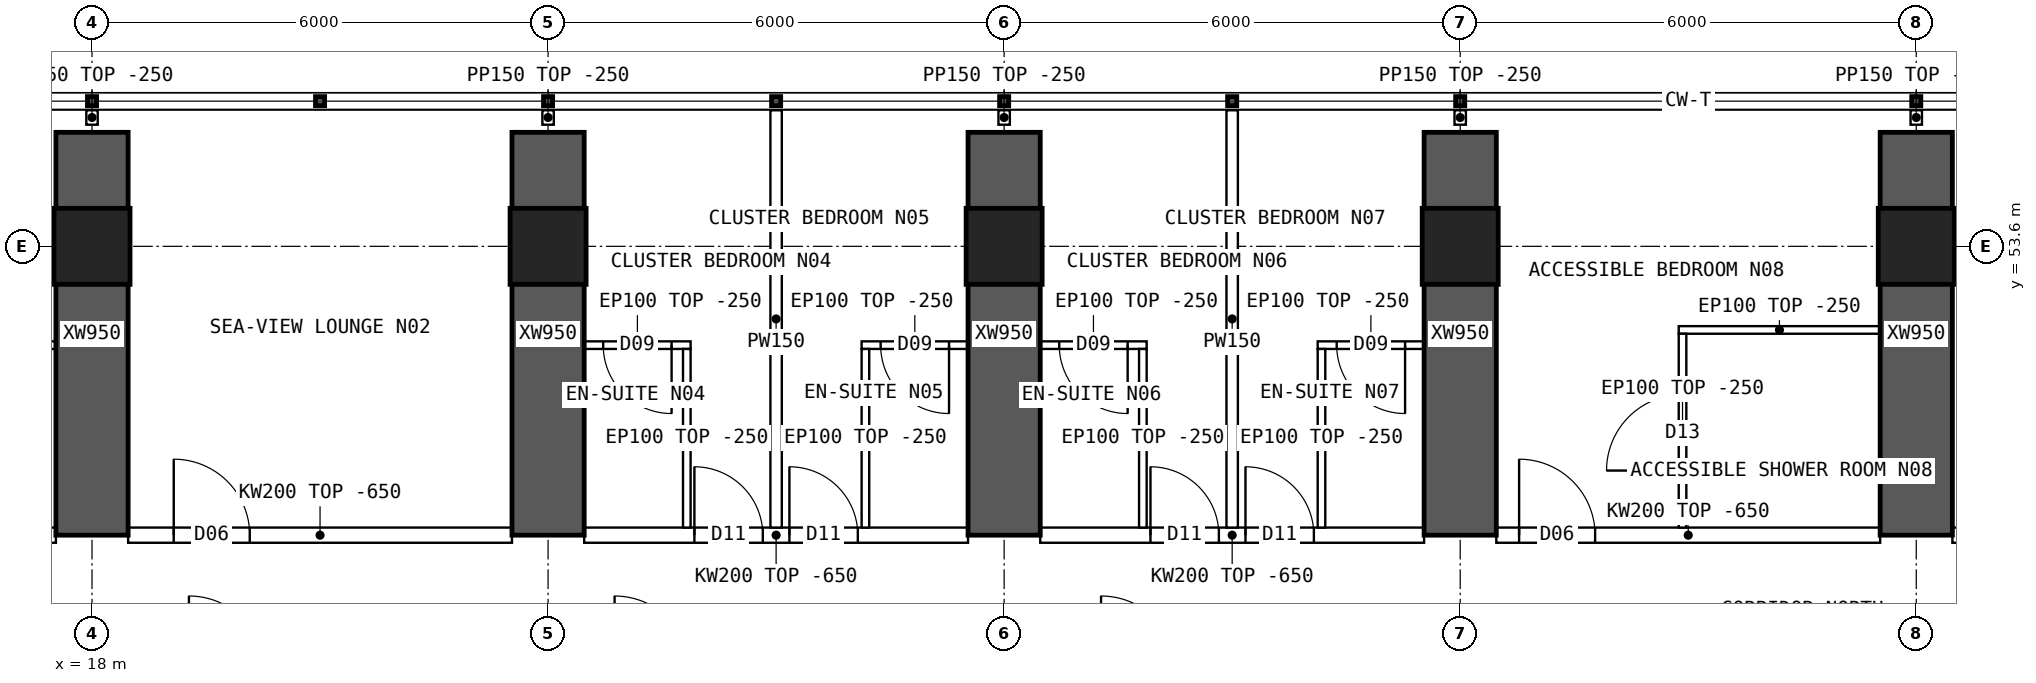
"""IFC4 building model, lengths in metres.
Left out: names, types, materials, properties, quantities, classifications, styles, units other than length and angle.
Written with IfcOpenShell. Run it as: python <this file> out.ifc"""

import sys

from ifc_helpers import new_model, si_unit, direction, frame, frame_2d, origin, origin_2d, place, context, subcontext, project, spatial, polyline, rectangle, hollow_rectangle, outline, extrude, element, fill, save


model = new_model("IFC4")
c1 = context("Model", 3, precision=1e-05, world=origin(), true_north=direction((0.0, 1.0)))
c2 = subcontext(c1, "Body", "Model", "MODEL_VIEW")
j1 = project(units=[si_unit("LENGTHUNIT", "METRE"), si_unit("PLANEANGLEUNIT", "RADIAN")], contexts=[c1])
p1 = place(None, origin())
s1 = spatial("IfcSite", under=j1, at=p1, CompositionType="ELEMENT")
p2 = place(p1, origin())
s2 = spatial("IfcBuilding", under=s1, at=p2, CompositionType="ELEMENT")
p3 = place(p2, frame((0.0, 0.0, 88.15)))
s3 = spatial("IfcBuildingStorey", under=s2, at=p3, CompositionType="ELEMENT", Elevation=88.15)
for number, where, z_axis, x_axis in (
    (1, (18.0, 53.6, 0.0), (0.0, 0.0, 1.0), (1.0, 0.0, 0.0)),
    (2, (24.0, 53.6, 0.0), (0.0, 0.0, 1.0), (1.0, 0.0, 0.0)),
    (3, (30.0, 53.6, 0.0), (0.0, 0.0, 1.0), (1.0, 0.0, 0.0)),
    (4, (36.0, 53.6, 0.0), (0.0, 0.0, 1.0), (1.0, 0.0, 0.0)),
    (5, (42.0, 53.6, 0.0), (0.0, 0.0, 1.0), (1.0, 0.0, 0.0)),
):
    element("IfcColumn", number, at=place(p3, frame(where, z_axis=z_axis, x_axis=x_axis)), inside=s3, PredefinedType="COLUMN", context=c2, shape_type="SweptSolid", body=[
        extrude(hollow_rectangle(XDim=1.0, YDim=1.0, WallThickness=0.1, at=origin_2d()), origin(), (0.0, 0.0, 1.0), 3.75),
    ])
for number, where, z_axis, x_axis in (
    (6, (18.0, 49.8, 0.0), (0.0, 0.0, 1.0), (0.0, 1.0, 0.0)),
    (7, (24.0, 49.8, 0.0), (0.0, 0.0, 1.0), (0.0, 1.0, 0.0)),
    (8, (30.0, 49.8, 0.0), (0.0, 0.0, 1.0), (0.0, 1.0, 0.0)),
    (9, (36.0, 49.8, 0.0), (0.0, 0.0, 1.0), (0.0, 1.0, 0.0)),
    (10, (42.0, 49.8, 0.0), (0.0, 0.0, 1.0), (0.0, 1.0, 0.0)),
):
    element("IfcWall", number, at=place(p3, frame(where, z_axis=z_axis, x_axis=x_axis)), inside=s3, PredefinedType="SHEAR", context=c2, shape_type="SweptSolid", body=[
        extrude(rectangle(XDim=5.3, YDim=0.95, at=frame_2d((2.65, 0.0))), origin(), (0.0, 0.0, 1.0), 3.75),
    ])
p4 = place(p3, frame((12.475, 49.8, 0.0), z_axis=(0.0, 0.0, 1.0), x_axis=(1.0, 0.0, 0.0)))
e11 = element("IfcWall", 11, at=p4, inside=s3, PredefinedType="SOLIDWALL", context=c2, shape_type="SweptSolid", body=[
    extrude(outline(polyline([(0.0, 0.0), (5.05, 0.0), (5.05, 3.1), (0.0, 3.1), (0.0, 0.0)])), frame((0.0, 0.1, 0.0), z_axis=(0.0, -1.0, 0.0), x_axis=(1.0, 0.0, 0.0)), (0.0, 0.0, 1.0), 0.2),
])
p5 = place(p4, frame((1.45, 0.0, 0.0)))
e12 = element("IfcOpeningElement", 12, at=p5, cuts=e11, PredefinedType="OPENING", context=c2, shape_type="SweptSolid", body=[
    extrude(rectangle(XDim=0.9, YDim=2.1, at=frame_2d((0.45, 1.05))), frame((0.0, 0.11, 0.0), z_axis=(0.0, -1.0, 0.0), x_axis=(1.0, 0.0, 0.0)), (0.0, 0.0, 1.0), 0.22),
])
p6 = place(p4, frame((2.7, 0.0, 0.0)))
e13 = element("IfcOpeningElement", 13, at=p6, cuts=e11, PredefinedType="OPENING", context=c2, shape_type="SweptSolid", body=[
    extrude(rectangle(XDim=0.9, YDim=2.1, at=frame_2d((0.45, 1.05))), frame((0.0, 0.11, 0.0), z_axis=(0.0, -1.0, 0.0), x_axis=(1.0, 0.0, 0.0)), (0.0, 0.0, 1.0), 0.22),
])
p7 = place(p3, frame((18.475, 49.8, 0.0), z_axis=(0.0, 0.0, 1.0), x_axis=(1.0, 0.0, 0.0)))
e14 = element("IfcWall", 14, at=p7, inside=s3, PredefinedType="SOLIDWALL", context=c2, shape_type="SweptSolid", body=[
    extrude(outline(polyline([(0.0, 0.0), (5.05, 0.0), (5.05, 3.1), (0.0, 3.1), (0.0, 0.0)])), frame((0.0, 0.1, 0.0), z_axis=(0.0, -1.0, 0.0), x_axis=(1.0, 0.0, 0.0)), (0.0, 0.0, 1.0), 0.2),
])
p8 = place(p7, frame((0.6, 0.0, 0.0)))
e15 = element("IfcOpeningElement", 15, at=p8, cuts=e14, PredefinedType="OPENING", context=c2, shape_type="SweptSolid", body=[
    extrude(rectangle(XDim=1.0, YDim=2.1, at=frame_2d((0.5, 1.05))), frame((0.0, 0.11, 0.0), z_axis=(0.0, -1.0, 0.0), x_axis=(1.0, 0.0, 0.0)), (0.0, 0.0, 1.0), 0.22),
])
p9 = place(p3, frame((24.475, 49.8, 0.0), z_axis=(0.0, 0.0, 1.0), x_axis=(1.0, 0.0, 0.0)))
e16 = element("IfcWall", 16, at=p9, inside=s3, PredefinedType="SOLIDWALL", context=c2, shape_type="SweptSolid", body=[
    extrude(outline(polyline([(0.0, 0.0), (5.05, 0.0), (5.05, 3.1), (0.0, 3.1), (0.0, 0.0)])), frame((0.0, 0.1, 0.0), z_axis=(0.0, -1.0, 0.0), x_axis=(1.0, 0.0, 0.0)), (0.0, 0.0, 1.0), 0.2),
])
p10 = place(p9, frame((1.45, 0.0, 0.0)))
e17 = element("IfcOpeningElement", 17, at=p10, cuts=e16, PredefinedType="OPENING", context=c2, shape_type="SweptSolid", body=[
    extrude(rectangle(XDim=0.9, YDim=2.1, at=frame_2d((0.45, 1.05))), frame((0.0, 0.11, 0.0), z_axis=(0.0, -1.0, 0.0), x_axis=(1.0, 0.0, 0.0)), (0.0, 0.0, 1.0), 0.22),
])
p11 = place(p9, frame((2.7, 0.0, 0.0)))
e18 = element("IfcOpeningElement", 18, at=p11, cuts=e16, PredefinedType="OPENING", context=c2, shape_type="SweptSolid", body=[
    extrude(rectangle(XDim=0.9, YDim=2.1, at=frame_2d((0.45, 1.05))), frame((0.0, 0.11, 0.0), z_axis=(0.0, -1.0, 0.0), x_axis=(1.0, 0.0, 0.0)), (0.0, 0.0, 1.0), 0.22),
])
p12 = place(p3, frame((30.475, 49.8, 0.0), z_axis=(0.0, 0.0, 1.0), x_axis=(1.0, 0.0, 0.0)))
e19 = element("IfcWall", 19, at=p12, inside=s3, PredefinedType="SOLIDWALL", context=c2, shape_type="SweptSolid", body=[
    extrude(outline(polyline([(0.0, 0.0), (5.05, 0.0), (5.05, 3.1), (0.0, 3.1), (0.0, 0.0)])), frame((0.0, 0.1, 0.0), z_axis=(0.0, -1.0, 0.0), x_axis=(1.0, 0.0, 0.0)), (0.0, 0.0, 1.0), 0.2),
])
p13 = place(p12, frame((1.45, 0.0, 0.0)))
e20 = element("IfcOpeningElement", 20, at=p13, cuts=e19, PredefinedType="OPENING", context=c2, shape_type="SweptSolid", body=[
    extrude(rectangle(XDim=0.9, YDim=2.1, at=frame_2d((0.45, 1.05))), frame((0.0, 0.11, 0.0), z_axis=(0.0, -1.0, 0.0), x_axis=(1.0, 0.0, 0.0)), (0.0, 0.0, 1.0), 0.22),
])
p14 = place(p12, frame((2.7, 0.0, 0.0)))
e21 = element("IfcOpeningElement", 21, at=p14, cuts=e19, PredefinedType="OPENING", context=c2, shape_type="SweptSolid", body=[
    extrude(rectangle(XDim=0.9, YDim=2.1, at=frame_2d((0.45, 1.05))), frame((0.0, 0.11, 0.0), z_axis=(0.0, -1.0, 0.0), x_axis=(1.0, 0.0, 0.0)), (0.0, 0.0, 1.0), 0.22),
])
p15 = place(p3, frame((36.475, 49.8, 0.0), z_axis=(0.0, 0.0, 1.0), x_axis=(1.0, 0.0, 0.0)))
e22 = element("IfcWall", 22, at=p15, inside=s3, PredefinedType="SOLIDWALL", context=c2, shape_type="SweptSolid", body=[
    extrude(outline(polyline([(0.0, 0.0), (5.05, 0.0), (5.05, 3.1), (0.0, 3.1), (0.0, 0.0)])), frame((0.0, 0.1, 0.0), z_axis=(0.0, -1.0, 0.0), x_axis=(1.0, 0.0, 0.0)), (0.0, 0.0, 1.0), 0.2),
])
p16 = place(p15, frame((0.3, 0.0, 0.0)))
e23 = element("IfcOpeningElement", 23, at=p16, cuts=e22, PredefinedType="OPENING", context=c2, shape_type="SweptSolid", body=[
    extrude(rectangle(XDim=1.0, YDim=2.1, at=frame_2d((0.5, 1.05))), frame((0.0, 0.11, 0.0), z_axis=(0.0, -1.0, 0.0), x_axis=(1.0, 0.0, 0.0)), (0.0, 0.0, 1.0), 0.22),
])
p17 = place(p3, frame((42.475, 49.8, 0.0), z_axis=(0.0, 0.0, 1.0), x_axis=(1.0, 0.0, 0.0)))
e24 = element("IfcWall", 24, at=p17, inside=s3, PredefinedType="SOLIDWALL", context=c2, shape_type="SweptSolid", body=[
    extrude(outline(polyline([(0.0, 0.0), (5.05, 0.0), (5.05, 3.1), (0.0, 3.1), (0.0, 0.0)])), frame((0.0, 0.1, 0.0), z_axis=(0.0, -1.0, 0.0), x_axis=(1.0, 0.0, 0.0)), (0.0, 0.0, 1.0), 0.2),
])
p18 = place(p17, frame((0.6, 0.0, 0.0)))
e25 = element("IfcOpeningElement", 25, at=p18, cuts=e24, PredefinedType="OPENING", context=c2, shape_type="SweptSolid", body=[
    extrude(rectangle(XDim=1.0, YDim=2.1, at=frame_2d((0.5, 1.05))), frame((0.0, 0.11, 0.0), z_axis=(0.0, -1.0, 0.0), x_axis=(1.0, 0.0, 0.0)), (0.0, 0.0, 1.0), 0.22),
])
p19 = place(p3, frame((16.125, 52.3, 0.0), z_axis=(0.0, 0.0, 1.0), x_axis=(1.0, 0.0, 0.0)))
e26 = element("IfcWall", 26, at=p19, inside=s3, PredefinedType="PARTITIONING", context=c2, shape_type="SweptSolid", body=[
    extrude(rectangle(XDim=1.4, YDim=0.1, at=frame_2d((0.7, 0.0))), origin(), (0.0, 0.0, 1.0), 3.5),
])
p20 = place(p19, frame((0.25, 0.0, 0.0)))
e27 = element("IfcOpeningElement", 27, at=p20, cuts=e26, PredefinedType="OPENING", context=c2, shape_type="SweptSolid", body=[
    extrude(rectangle(XDim=0.9, YDim=2.1, at=frame_2d((0.45, 1.05))), frame((0.0, 0.06, 0.0), z_axis=(0.0, -1.0, 0.0), x_axis=(1.0, 0.0, 0.0)), (0.0, 0.0, 1.0), 0.12),
])
p21 = place(p3, frame((27.0, 55.39, 0.0), z_axis=(0.0, 0.0, 1.0), x_axis=(0.0, -1.0, 0.0)))
e28 = element("IfcWall", 28, at=p21, inside=s3, PredefinedType="PARTITIONING", context=c2, shape_type="SweptSolid", body=[
    extrude(outline(polyline([(0.0, 0.0), (5.49, 0.0), (5.49, 3.1), (5.442, 3.1), (5.44, 3.5), (1.992, 3.5), (1.99, 3.1), (1.592, 3.1), (1.59, 3.5), (0.0, 3.5), (0.0, 0.0)])), frame((0.0, 0.075, 0.0), z_axis=(0.0, -1.0, 0.0), x_axis=(1.0, 0.0, 0.0)), (0.0, 0.0, 1.0), 0.15),
])
p22 = place(p3, frame((24.475, 52.3, 0.0), z_axis=(0.0, 0.0, 1.0), x_axis=(1.0, 0.0, 0.0)))
e29 = element("IfcWall", 29, at=p22, inside=s3, PredefinedType="PARTITIONING", context=c2, shape_type="SweptSolid", body=[
    extrude(rectangle(XDim=1.4, YDim=0.1, at=frame_2d((0.7, 0.0))), origin(), (0.0, 0.0, 1.0), 3.5),
])
p23 = place(p22, frame((0.25, 0.0, 0.0)))
e30 = element("IfcOpeningElement", 30, at=p23, cuts=e29, PredefinedType="OPENING", context=c2, shape_type="SweptSolid", body=[
    extrude(rectangle(XDim=0.9, YDim=2.1, at=frame_2d((0.45, 1.05))), frame((0.0, 0.06, 0.0), z_axis=(0.0, -1.0, 0.0), x_axis=(1.0, 0.0, 0.0)), (0.0, 0.0, 1.0), 0.12),
])
p24 = place(p3, frame((25.825, 52.25, 0.0), z_axis=(0.0, 0.0, 1.0), x_axis=(0.0, -1.0, 0.0)))
e31 = element("IfcWall", 31, at=p24, inside=s3, PredefinedType="PARTITIONING", context=c2, shape_type="SweptSolid", body=[
    extrude(outline(polyline([(0.0, 0.0), (2.35, 0.0), (2.35, 3.1), (2.302, 3.1), (2.3, 3.5), (0.0, 3.5), (0.0, 0.0)])), frame((0.0, 0.05, 0.0), z_axis=(0.0, -1.0, 0.0), x_axis=(1.0, 0.0, 0.0)), (0.0, 0.0, 1.0), 0.1),
])
p25 = place(p3, frame((28.125, 52.3, 0.0), z_axis=(0.0, 0.0, 1.0), x_axis=(1.0, 0.0, 0.0)))
e32 = element("IfcWall", 32, at=p25, inside=s3, PredefinedType="PARTITIONING", context=c2, shape_type="SweptSolid", body=[
    extrude(rectangle(XDim=1.4, YDim=0.1, at=frame_2d((0.7, 0.0))), origin(), (0.0, 0.0, 1.0), 3.5),
])
p26 = place(p25, frame((0.25, 0.0, 0.0)))
e33 = element("IfcOpeningElement", 33, at=p26, cuts=e32, PredefinedType="OPENING", context=c2, shape_type="SweptSolid", body=[
    extrude(rectangle(XDim=0.9, YDim=2.1, at=frame_2d((0.45, 1.05))), frame((0.0, 0.06, 0.0), z_axis=(0.0, -1.0, 0.0), x_axis=(1.0, 0.0, 0.0)), (0.0, 0.0, 1.0), 0.12),
])
p27 = place(p3, frame((28.175, 52.25, 0.0), z_axis=(0.0, 0.0, 1.0), x_axis=(0.0, -1.0, 0.0)))
e34 = element("IfcWall", 34, at=p27, inside=s3, PredefinedType="PARTITIONING", context=c2, shape_type="SweptSolid", body=[
    extrude(outline(polyline([(0.0, 0.0), (2.35, 0.0), (2.35, 3.1), (2.302, 3.1), (2.3, 3.5), (0.0, 3.5), (0.0, 0.0)])), frame((0.0, 0.05, 0.0), z_axis=(0.0, -1.0, 0.0), x_axis=(1.0, 0.0, 0.0)), (0.0, 0.0, 1.0), 0.1),
])
p28 = place(p3, frame((33.0, 55.39, 0.0), z_axis=(0.0, 0.0, 1.0), x_axis=(0.0, -1.0, 0.0)))
e35 = element("IfcWall", 35, at=p28, inside=s3, PredefinedType="PARTITIONING", context=c2, shape_type="SweptSolid", body=[
    extrude(outline(polyline([(0.0, 0.0), (5.49, 0.0), (5.49, 3.1), (5.442, 3.1), (5.44, 3.5), (1.992, 3.5), (1.99, 3.1), (1.592, 3.1), (1.59, 3.5), (0.0, 3.5), (0.0, 0.0)])), frame((0.0, 0.075, 0.0), z_axis=(0.0, -1.0, 0.0), x_axis=(1.0, 0.0, 0.0)), (0.0, 0.0, 1.0), 0.15),
])
p29 = place(p3, frame((30.475, 52.3, 0.0), z_axis=(0.0, 0.0, 1.0), x_axis=(1.0, 0.0, 0.0)))
e36 = element("IfcWall", 36, at=p29, inside=s3, PredefinedType="PARTITIONING", context=c2, shape_type="SweptSolid", body=[
    extrude(rectangle(XDim=1.4, YDim=0.1, at=frame_2d((0.7, 0.0))), origin(), (0.0, 0.0, 1.0), 3.5),
])
p30 = place(p29, frame((0.25, 0.0, 0.0)))
e37 = element("IfcOpeningElement", 37, at=p30, cuts=e36, PredefinedType="OPENING", context=c2, shape_type="SweptSolid", body=[
    extrude(rectangle(XDim=0.9, YDim=2.1, at=frame_2d((0.45, 1.05))), frame((0.0, 0.06, 0.0), z_axis=(0.0, -1.0, 0.0), x_axis=(1.0, 0.0, 0.0)), (0.0, 0.0, 1.0), 0.12),
])
p31 = place(p3, frame((31.825, 52.25, 0.0), z_axis=(0.0, 0.0, 1.0), x_axis=(0.0, -1.0, 0.0)))
e38 = element("IfcWall", 38, at=p31, inside=s3, PredefinedType="PARTITIONING", context=c2, shape_type="SweptSolid", body=[
    extrude(outline(polyline([(0.0, 0.0), (2.35, 0.0), (2.35, 3.1), (2.302, 3.1), (2.3, 3.5), (0.0, 3.5), (0.0, 0.0)])), frame((0.0, 0.05, 0.0), z_axis=(0.0, -1.0, 0.0), x_axis=(1.0, 0.0, 0.0)), (0.0, 0.0, 1.0), 0.1),
])
p32 = place(p3, frame((34.125, 52.3, 0.0), z_axis=(0.0, 0.0, 1.0), x_axis=(1.0, 0.0, 0.0)))
e39 = element("IfcWall", 39, at=p32, inside=s3, PredefinedType="PARTITIONING", context=c2, shape_type="SweptSolid", body=[
    extrude(rectangle(XDim=1.4, YDim=0.1, at=frame_2d((0.7, 0.0))), origin(), (0.0, 0.0, 1.0), 3.5),
])
p33 = place(p32, frame((0.25, 0.0, 0.0)))
e40 = element("IfcOpeningElement", 40, at=p33, cuts=e39, PredefinedType="OPENING", context=c2, shape_type="SweptSolid", body=[
    extrude(rectangle(XDim=0.9, YDim=2.1, at=frame_2d((0.45, 1.05))), frame((0.0, 0.06, 0.0), z_axis=(0.0, -1.0, 0.0), x_axis=(1.0, 0.0, 0.0)), (0.0, 0.0, 1.0), 0.12),
])
p34 = place(p3, frame((34.175, 52.25, 0.0), z_axis=(0.0, 0.0, 1.0), x_axis=(0.0, -1.0, 0.0)))
e41 = element("IfcWall", 41, at=p34, inside=s3, PredefinedType="PARTITIONING", context=c2, shape_type="SweptSolid", body=[
    extrude(outline(polyline([(0.0, 0.0), (2.35, 0.0), (2.35, 3.1), (2.302, 3.1), (2.3, 3.5), (0.0, 3.5), (0.0, 0.0)])), frame((0.0, 0.05, 0.0), z_axis=(0.0, -1.0, 0.0), x_axis=(1.0, 0.0, 0.0)), (0.0, 0.0, 1.0), 0.1),
])
p35 = place(p3, frame((38.875, 52.5, 0.0), z_axis=(0.0, 0.0, 1.0), x_axis=(1.0, 0.0, 0.0)))
e42 = element("IfcWall", 42, at=p35, inside=s3, PredefinedType="PARTITIONING", context=c2, shape_type="SweptSolid", body=[
    extrude(rectangle(XDim=2.65, YDim=0.1, at=frame_2d((1.325, 0.0))), origin(), (0.0, 0.0, 1.0), 3.5),
])
p36 = place(p3, frame((38.925, 52.45, 0.0), z_axis=(0.0, 0.0, 1.0), x_axis=(0.0, -1.0, 0.0)))
e43 = element("IfcWall", 43, at=p36, inside=s3, PredefinedType="PARTITIONING", context=c2, shape_type="SweptSolid", body=[
    extrude(outline(polyline([(0.0, 0.0), (2.55, 0.0), (2.55, 3.1), (2.502, 3.1), (2.5, 3.5), (0.0, 3.5), (0.0, 0.0)])), frame((0.0, 0.05, 0.0), z_axis=(0.0, -1.0, 0.0), x_axis=(1.0, 0.0, 0.0)), (0.0, 0.0, 1.0), 0.1),
])
p37 = place(p36, frame((0.8, 0.0, 0.0)))
e44 = element("IfcOpeningElement", 44, at=p37, cuts=e43, PredefinedType="OPENING", context=c2, shape_type="SweptSolid", body=[
    extrude(rectangle(XDim=1.0, YDim=2.1, at=frame_2d((0.5, 1.05))), frame((0.0, 0.06, 0.0), z_axis=(0.0, -1.0, 0.0), x_axis=(1.0, 0.0, 0.0)), (0.0, 0.0, 1.0), 0.12),
])
for number, where, z_axis, x_axis in (
    (45, (18.0, 55.2, 0.0), (0.0, 0.0, 1.0), (0.0, 1.0, 0.0)),
    (46, (24.0, 55.2, 0.0), (0.0, 0.0, 1.0), (0.0, 1.0, 0.0)),
    (47, (30.0, 55.2, 0.0), (0.0, 0.0, 1.0), (0.0, 1.0, 0.0)),
    (48, (36.0, 55.2, 0.0), (0.0, 0.0, 1.0), (0.0, 1.0, 0.0)),
    (49, (42.0, 55.2, 0.0), (0.0, 0.0, 1.0), (0.0, 1.0, 0.0)),
):
    element("IfcWall", number, at=place(p3, frame(where, z_axis=z_axis, x_axis=x_axis)), inside=s3, PredefinedType="PARTITIONING", context=c2, shape_type="SweptSolid", body=[
        extrude(rectangle(XDim=0.19, YDim=0.15, at=frame_2d((0.095, 0.0))), origin(), (0.0, 0.0, 1.0), 3.5),
    ])
p38 = place(p8, origin())
e50 = element("IfcDoor", 50, at=p38, inside=s3, OperationType="SINGLE_SWING_LEFT", PredefinedType="DOOR", context=c2, shape_type="SweptSolid", body=[
    extrude(rectangle(XDim=1.0, YDim=2.1, at=frame_2d((0.5, 1.05))), frame((0.0, 0.025, 0.0), z_axis=(0.0, -1.0, 0.0), x_axis=(1.0, 0.0, 0.0)), (0.0, 0.0, 1.0), 0.05),
])
fill(e15, e50)
p39 = place(p23, origin())
e51 = element("IfcDoor", 51, at=p39, inside=s3, OperationType="SINGLE_SWING_RIGHT", PredefinedType="DOOR", context=c2, shape_type="SweptSolid", body=[
    extrude(rectangle(XDim=0.9, YDim=2.1, at=frame_2d((0.45, 1.05))), frame((0.0, 0.025, 0.0), z_axis=(0.0, -1.0, 0.0), x_axis=(1.0, 0.0, 0.0)), (0.0, 0.0, 1.0), 0.05),
])
fill(e30, e51)
p40 = place(p10, origin())
e52 = element("IfcDoor", 52, at=p40, inside=s3, OperationType="SINGLE_SWING_LEFT", PredefinedType="DOOR", context=c2, shape_type="SweptSolid", body=[
    extrude(rectangle(XDim=0.9, YDim=2.1, at=frame_2d((0.45, 1.05))), frame((0.0, 0.025, 0.0), z_axis=(0.0, -1.0, 0.0), x_axis=(1.0, 0.0, 0.0)), (0.0, 0.0, 1.0), 0.05),
])
fill(e17, e52)
p41 = place(p26, origin())
e53 = element("IfcDoor", 53, at=p41, inside=s3, OperationType="SINGLE_SWING_RIGHT", PredefinedType="DOOR", context=c2, shape_type="SweptSolid", body=[
    extrude(rectangle(XDim=0.9, YDim=2.1, at=frame_2d((0.45, 1.05))), frame((0.0, 0.025, 0.0), z_axis=(0.0, -1.0, 0.0), x_axis=(1.0, 0.0, 0.0)), (0.0, 0.0, 1.0), 0.05),
])
fill(e33, e53)
p42 = place(p11, origin())
e54 = element("IfcDoor", 54, at=p42, inside=s3, OperationType="SINGLE_SWING_LEFT", PredefinedType="DOOR", context=c2, shape_type="SweptSolid", body=[
    extrude(rectangle(XDim=0.9, YDim=2.1, at=frame_2d((0.45, 1.05))), frame((0.0, 0.025, 0.0), z_axis=(0.0, -1.0, 0.0), x_axis=(1.0, 0.0, 0.0)), (0.0, 0.0, 1.0), 0.05),
])
fill(e18, e54)
p43 = place(p30, origin())
e55 = element("IfcDoor", 55, at=p43, inside=s3, OperationType="SINGLE_SWING_RIGHT", PredefinedType="DOOR", context=c2, shape_type="SweptSolid", body=[
    extrude(rectangle(XDim=0.9, YDim=2.1, at=frame_2d((0.45, 1.05))), frame((0.0, 0.025, 0.0), z_axis=(0.0, -1.0, 0.0), x_axis=(1.0, 0.0, 0.0)), (0.0, 0.0, 1.0), 0.05),
])
fill(e37, e55)
p44 = place(p13, origin())
e56 = element("IfcDoor", 56, at=p44, inside=s3, OperationType="SINGLE_SWING_LEFT", PredefinedType="DOOR", context=c2, shape_type="SweptSolid", body=[
    extrude(rectangle(XDim=0.9, YDim=2.1, at=frame_2d((0.45, 1.05))), frame((0.0, 0.025, 0.0), z_axis=(0.0, -1.0, 0.0), x_axis=(1.0, 0.0, 0.0)), (0.0, 0.0, 1.0), 0.05),
])
fill(e20, e56)
p45 = place(p33, origin())
e57 = element("IfcDoor", 57, at=p45, inside=s3, OperationType="SINGLE_SWING_RIGHT", PredefinedType="DOOR", context=c2, shape_type="SweptSolid", body=[
    extrude(rectangle(XDim=0.9, YDim=2.1, at=frame_2d((0.45, 1.05))), frame((0.0, 0.025, 0.0), z_axis=(0.0, -1.0, 0.0), x_axis=(1.0, 0.0, 0.0)), (0.0, 0.0, 1.0), 0.05),
])
fill(e40, e57)
p46 = place(p14, origin())
e58 = element("IfcDoor", 58, at=p46, inside=s3, OperationType="SINGLE_SWING_LEFT", PredefinedType="DOOR", context=c2, shape_type="SweptSolid", body=[
    extrude(rectangle(XDim=0.9, YDim=2.1, at=frame_2d((0.45, 1.05))), frame((0.0, 0.025, 0.0), z_axis=(0.0, -1.0, 0.0), x_axis=(1.0, 0.0, 0.0)), (0.0, 0.0, 1.0), 0.05),
])
fill(e21, e58)
p47 = place(p37, origin())
e59 = element("IfcDoor", 59, at=p47, inside=s3, OperationType="SINGLE_SWING_RIGHT", PredefinedType="DOOR", context=c2, shape_type="SweptSolid", body=[
    extrude(rectangle(XDim=1.0, YDim=2.1, at=frame_2d((0.5, 1.05))), frame((0.0, 0.025, 0.0), z_axis=(0.0, -1.0, 0.0), x_axis=(1.0, 0.0, 0.0)), (0.0, 0.0, 1.0), 0.05),
])
fill(e44, e59)
p48 = place(p16, origin())
e60 = element("IfcDoor", 60, at=p48, inside=s3, OperationType="SINGLE_SWING_LEFT", PredefinedType="DOOR", context=c2, shape_type="SweptSolid", body=[
    extrude(rectangle(XDim=1.0, YDim=2.1, at=frame_2d((0.5, 1.05))), frame((0.0, 0.025, 0.0), z_axis=(0.0, -1.0, 0.0), x_axis=(1.0, 0.0, 0.0)), (0.0, 0.0, 1.0), 0.05),
])
fill(e23, e60)
save(model, sys.argv[1])
